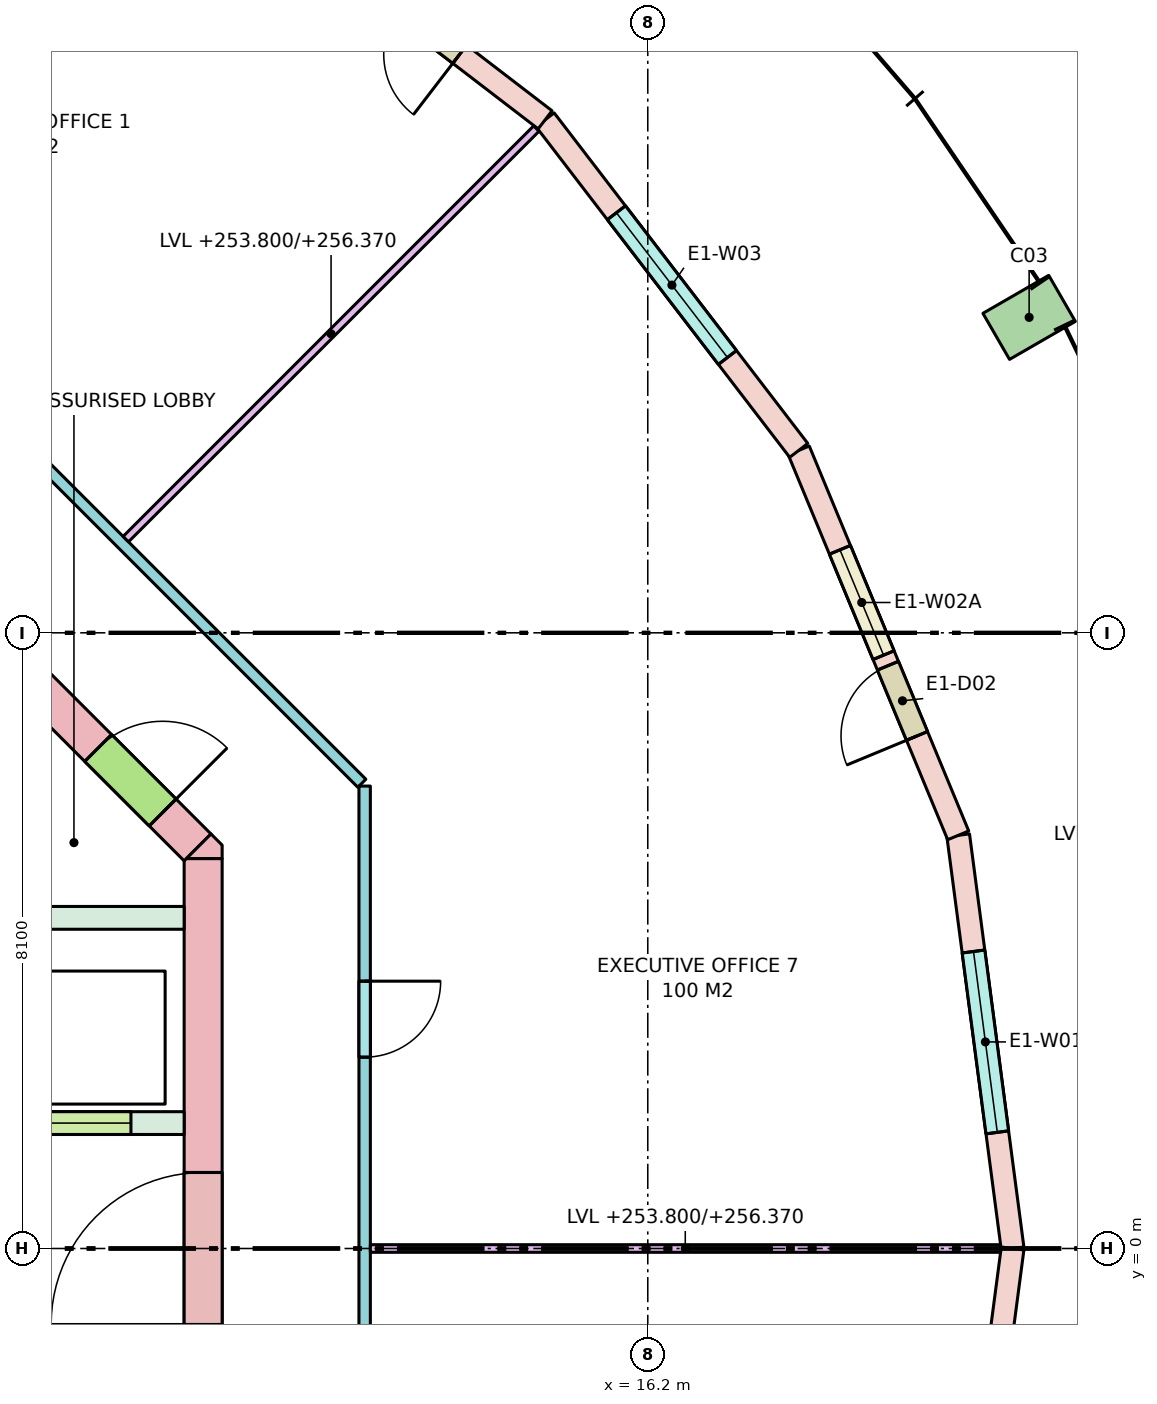
"""IFC4 building model, lengths in metres.
Left out: names, types, materials, properties, quantities, classifications, styles, units other than length and angle.
Written with IfcOpenShell. Run it as: python <this file> out.ifc"""

import sys

from ifc_helpers import new_model, si_unit, direction, frame, frame_2d, origin, origin_2d, place, context, subcontext, project, spatial, polyline, rectangle, outline, extrude, element, fill, save


model = new_model("IFC4")
c1 = context("Model", 3, precision=1e-05, world=origin(), true_north=direction((0.0, 1.0)))
c2 = subcontext(c1, "Body", "Model", "MODEL_VIEW")
j1 = project(units=[si_unit("LENGTHUNIT", "METRE"), si_unit("PLANEANGLEUNIT", "RADIAN")], contexts=[c1])
p1 = place(None, origin())
s1 = spatial("IfcSite", under=j1, at=p1, CompositionType="ELEMENT")
p2 = place(p1, origin())
s2 = spatial("IfcBuilding", under=s1, at=p2, CompositionType="ELEMENT")
p3 = place(p2, frame((0.0, 0.0, 253.8)))
s3 = spatial("IfcBuildingStorey", under=s2, at=p3, CompositionType="ELEMENT", Elevation=253.8)
p4 = place(p3, frame((21.218, 12.25, 0.0), z_axis=(0.0, 0.0, 1.0), x_axis=(-0.5, 0.866025403784, 0.0)))
e1 = element("IfcColumn", 1, at=p4, inside=s3, PredefinedType="COLUMN", context=c2, shape_type="SweptSolid", body=[
    extrude(rectangle(XDim=0.7, YDim=1.0, at=origin_2d()), origin(), (0.0, 0.0, 1.0), 3.7),
])
p5 = place(p3, frame((10.35, -5.13, -0.28), z_axis=(0.0, 0.0, 1.0), x_axis=(0.0, 1.0, 0.0)))
e2 = element("IfcWall", 2, at=p5, inside=s3, PredefinedType="SHEAR", context=c2, shape_type="SweptSolid", body=[
    extrude(rectangle(XDim=10.26, YDim=0.5, at=frame_2d((5.13, 0.0))), origin(), (0.0, 0.0, 1.0), 3.7),
])
p6 = place(p5, frame((4.13, 0.0, 0.28)))
e3 = element("IfcOpeningElement", 3, at=p6, cuts=e2, PredefinedType="OPENING", context=c2, shape_type="SweptSolid", body=[
    extrude(rectangle(XDim=2.0, YDim=2.1, at=frame_2d((1.0, 1.05))), frame((0.0, 0.26, 0.0), z_axis=(0.0, -1.0, 0.0), x_axis=(1.0, 0.0, 0.0)), (0.0, 0.0, 1.0), 0.52),
])
p7 = place(p3, frame((7.277, 8.277, -0.28), z_axis=(0.0, 0.0, 1.0), x_axis=(0.707106781187, -0.707106781187, 0.0)))
e4 = element("IfcWall", 4, at=p7, inside=s3, PredefinedType="SHEAR", context=c2, shape_type="SweptSolid", body=[
    extrude(rectangle(XDim=4.243, YDim=0.5, at=frame_2d((2.121, 0.0))), origin(), (0.0, 0.0, 1.0), 3.7),
])
p8 = place(p7, frame((2.393, 0.0, 0.28)))
e5 = element("IfcOpeningElement", 5, at=p8, cuts=e4, PredefinedType="OPENING", context=c2, shape_type="SweptSolid", body=[
    extrude(rectangle(XDim=1.2, YDim=2.1, at=frame_2d((0.6, 1.05))), frame((0.0, 0.26, 0.0), z_axis=(0.0, -1.0, 0.0), x_axis=(1.0, 0.0, 0.0)), (0.0, 0.0, 1.0), 0.52),
])
p9 = place(p3, frame((0.0, 0.0, -0.28)))
e6 = element("IfcWall", 6, at=p9, inside=s3, PredefinedType="SHEAR", context=c2, shape_type="SweptSolid", body=[
    extrude(outline(polyline([(10.6, 5.307), (10.6, 5.13), (10.13, 5.13), (10.454, 5.454), (10.6, 5.307)])), origin(), (0.0, 0.0, 1.0), 3.7),
])
p10 = place(p3, frame((2.0, 4.35, 0.0), z_axis=(0.0, 0.0, 1.0), x_axis=(1.0, 0.0, 0.0)))
e7 = element("IfcWall", 7, at=p10, inside=s3, PredefinedType="SOLIDWALL", context=c2, shape_type="SweptSolid", body=[
    extrude(rectangle(XDim=8.1, YDim=0.3, at=frame_2d((4.05, 0.0))), origin(), (0.0, 0.0, 1.0), 3.42),
])
p11 = place(p3, frame((2.0, 1.65, 0.0), z_axis=(0.0, 0.0, 1.0), x_axis=(1.0, 0.0, 0.0)))
e8 = element("IfcWall", 8, at=p11, inside=s3, PredefinedType="SOLIDWALL", context=c2, shape_type="SweptSolid", body=[
    extrude(rectangle(XDim=8.1, YDim=0.3, at=frame_2d((4.05, 0.0))), origin(), (0.0, 0.0, 1.0), 3.42),
])
p12 = place(p11, frame((0.85, 0.0, 0.0)))
e9 = element("IfcOpeningElement", 9, at=p12, cuts=e8, PredefinedType="OPENING", context=c2, shape_type="SweptSolid", body=[
    extrude(rectangle(XDim=1.1, YDim=2.1, at=frame_2d((0.55, 1.05))), frame((0.0, 0.16, 0.0), z_axis=(0.0, -1.0, 0.0), x_axis=(1.0, 0.0, 0.0)), (0.0, 0.0, 1.0), 0.32),
])
p13 = place(p11, frame((3.5, 0.0, 0.0)))
e10 = element("IfcOpeningElement", 10, at=p13, cuts=e8, PredefinedType="OPENING", context=c2, shape_type="SweptSolid", body=[
    extrude(rectangle(XDim=1.1, YDim=2.1, at=frame_2d((0.55, 1.05))), frame((0.0, 0.16, 0.0), z_axis=(0.0, -1.0, 0.0), x_axis=(1.0, 0.0, 0.0)), (0.0, 0.0, 1.0), 0.32),
])
p14 = place(p11, frame((6.3, 0.0, 0.0)))
e11 = element("IfcOpeningElement", 11, at=p14, cuts=e8, PredefinedType="OPENING", context=c2, shape_type="SweptSolid", body=[
    extrude(rectangle(XDim=1.1, YDim=2.1, at=frame_2d((0.55, 1.05))), frame((0.0, 0.16, 0.0), z_axis=(0.0, -1.0, 0.0), x_axis=(1.0, 0.0, 0.0)), (0.0, 0.0, 1.0), 0.32),
])
p15 = place(p3, frame((21.0, 0.0, 0.0), z_axis=(0.0, 0.0, 1.0), x_axis=(-0.130527087244, 0.991444743541, 0.0)))
e12 = element("IfcWall", 12, at=p15, inside=s3, PredefinedType="STANDARD", context=c2, shape_type="SweptSolid", body=[
    extrude(rectangle(XDim=5.482, YDim=0.3, at=frame_2d((2.741, 0.0))), origin(), (0.0, 0.0, 1.0), 3.42),
])
p16 = place(p15, frame((1.541, 0.0, 0.8)))
e13 = element("IfcOpeningElement", 13, at=p16, cuts=e12, PredefinedType="OPENING", context=c2, shape_type="SweptSolid", body=[
    extrude(rectangle(XDim=2.4, YDim=2.4, at=frame_2d((1.2, 1.2))), frame((0.0, 0.16, 0.0), z_axis=(0.0, -1.0, 0.0), x_axis=(1.0, 0.0, 0.0)), (0.0, 0.0, 1.0), 0.32),
])
p17 = place(p3, frame((20.284, 5.435, 0.0), z_axis=(0.0, 0.0, 1.0), x_axis=(-0.382688740813, 0.923877333662, 0.0)))
e14 = element("IfcWall", 14, at=p17, inside=s3, PredefinedType="STANDARD", context=c2, shape_type="SweptSolid", body=[
    extrude(rectangle(XDim=5.482, YDim=0.3, at=frame_2d((2.741, 0.0))), origin(), (0.0, 0.0, 1.0), 3.42),
])
p18 = place(p17, frame((1.416, 0.0, 0.0)))
e15 = element("IfcOpeningElement", 15, at=p18, cuts=e14, PredefinedType="OPENING", context=c2, shape_type="SweptSolid", body=[
    extrude(rectangle(XDim=1.0, YDim=2.4, at=frame_2d((0.5, 1.2))), frame((0.0, 0.16, 0.0), z_axis=(0.0, -1.0, 0.0), x_axis=(1.0, 0.0, 0.0)), (0.0, 0.0, 1.0), 0.32),
])
p19 = place(p17, frame((2.566, 0.0, 0.8)))
e16 = element("IfcOpeningElement", 16, at=p19, cuts=e14, PredefinedType="OPENING", context=c2, shape_type="SweptSolid", body=[
    extrude(rectangle(XDim=1.5, YDim=2.4, at=frame_2d((0.75, 1.2))), frame((0.0, 0.16, 0.0), z_axis=(0.0, -1.0, 0.0), x_axis=(1.0, 0.0, 0.0)), (0.0, 0.0, 1.0), 0.32),
])
p20 = place(p3, frame((18.187, 10.5, 0.0), z_axis=(0.0, 0.0, 1.0), x_axis=(-0.608784891166, 0.793335336593, 0.0)))
e17 = element("IfcWall", 17, at=p20, inside=s3, PredefinedType="STANDARD", context=c2, shape_type="SweptSolid", body=[
    extrude(rectangle(XDim=5.482, YDim=0.3, at=frame_2d((2.741, 0.0))), origin(), (0.0, 0.0, 1.0), 3.42),
])
p21 = place(p20, frame((1.541, 0.0, 0.8)))
e18 = element("IfcOpeningElement", 18, at=p21, cuts=e17, PredefinedType="OPENING", context=c2, shape_type="SweptSolid", body=[
    extrude(rectangle(XDim=2.4, YDim=2.4, at=frame_2d((1.2, 1.2))), frame((0.0, 0.16, 0.0), z_axis=(0.0, -1.0, 0.0), x_axis=(1.0, 0.0, 0.0)), (0.0, 0.0, 1.0), 0.32),
])
p22 = place(p3, frame((14.849, 14.849, 0.0), z_axis=(0.0, 0.0, 1.0), x_axis=(-0.793335336593, 0.608784891166, 0.0)))
e19 = element("IfcWall", 19, at=p22, inside=s3, PredefinedType="STANDARD", context=c2, shape_type="SweptSolid", body=[
    extrude(rectangle(XDim=5.482, YDim=0.3, at=frame_2d((2.741, 0.0))), origin(), (0.0, 0.0, 1.0), 3.42),
])
p23 = place(p22, frame((1.416, 0.0, 0.0)))
e20 = element("IfcOpeningElement", 20, at=p23, cuts=e19, PredefinedType="OPENING", context=c2, shape_type="SweptSolid", body=[
    extrude(rectangle(XDim=1.0, YDim=2.4, at=frame_2d((0.5, 1.2))), frame((0.0, 0.16, 0.0), z_axis=(0.0, -1.0, 0.0), x_axis=(1.0, 0.0, 0.0)), (0.0, 0.0, 1.0), 0.32),
])
p24 = place(p22, frame((2.566, 0.0, 0.8)))
e21 = element("IfcOpeningElement", 21, at=p24, cuts=e19, PredefinedType="OPENING", context=c2, shape_type="SweptSolid", body=[
    extrude(rectangle(XDim=1.5, YDim=2.4, at=frame_2d((0.75, 1.2))), frame((0.0, 0.16, 0.0), z_axis=(0.0, -1.0, 0.0), x_axis=(1.0, 0.0, 0.0)), (0.0, 0.0, 1.0), 0.32),
])
p25 = place(p3, frame((20.284, -5.435, 0.0), z_axis=(0.0, 0.0, 1.0), x_axis=(0.130527087244, 0.991444743541, 0.0)))
e22 = element("IfcWall", 22, at=p25, inside=s3, PredefinedType="STANDARD", context=c2, shape_type="SweptSolid", body=[
    extrude(rectangle(XDim=5.482, YDim=0.3, at=frame_2d((2.741, 0.0))), origin(), (0.0, 0.0, 1.0), 3.42),
])
p26 = place(p25, frame((1.416, 0.0, 0.0)))
e23 = element("IfcOpeningElement", 23, at=p26, cuts=e22, PredefinedType="OPENING", context=c2, shape_type="SweptSolid", body=[
    extrude(rectangle(XDim=1.0, YDim=2.4, at=frame_2d((0.5, 1.2))), frame((0.0, 0.16, 0.0), z_axis=(0.0, -1.0, 0.0), x_axis=(1.0, 0.0, 0.0)), (0.0, 0.0, 1.0), 0.32),
])
p27 = place(p25, frame((2.566, 0.0, 0.8)))
e24 = element("IfcOpeningElement", 24, at=p27, cuts=e22, PredefinedType="OPENING", context=c2, shape_type="SweptSolid", body=[
    extrude(rectangle(XDim=1.5, YDim=2.4, at=frame_2d((0.75, 1.2))), frame((0.0, 0.16, 0.0), z_axis=(0.0, -1.0, 0.0), x_axis=(1.0, 0.0, 0.0)), (0.0, 0.0, 1.0), 0.32),
])
p28 = place(p3, frame((8.121, 10.438, 0.0), z_axis=(0.0, 0.0, 1.0), x_axis=(0.707106781187, -0.707106781187, 0.0)))
e25 = element("IfcWall", 25, at=p28, inside=s3, PredefinedType="PARTITIONING", context=c2, shape_type="SweptSolid", body=[
    extrude(rectangle(XDim=6.105, YDim=0.15, at=frame_2d((3.053, 0.0))), origin(), (0.0, 0.0, 1.0), 2.57),
])
p29 = place(p3, frame((12.475, 6.084, 0.0), z_axis=(0.0, 0.0, 1.0), x_axis=(0.0, -1.0, 0.0)))
e26 = element("IfcWall", 26, at=p29, inside=s3, PredefinedType="PARTITIONING", context=c2, shape_type="SweptSolid", body=[
    extrude(rectangle(XDim=12.167, YDim=0.15, at=frame_2d((6.084, 0.0))), origin(), (0.0, 0.0, 1.0), 2.57),
])
p30 = place(p29, frame((8.601, 0.0, 0.0)))
e27 = element("IfcOpeningElement", 27, at=p30, cuts=e26, PredefinedType="OPENING", context=c2, shape_type="SweptSolid", body=[
    extrude(rectangle(XDim=1.0, YDim=2.1, at=frame_2d((0.5, 1.05))), frame((0.0, 0.085, 0.0), z_axis=(0.0, -1.0, 0.0), x_axis=(1.0, 0.0, 0.0)), (0.0, 0.0, 1.0), 0.17),
])
p31 = place(p29, frame((2.567, 0.0, 0.0)))
e28 = element("IfcOpeningElement", 28, at=p31, cuts=e26, PredefinedType="OPENING", context=c2, shape_type="SweptSolid", body=[
    extrude(rectangle(XDim=1.0, YDim=2.1, at=frame_2d((0.5, 1.05))), frame((0.0, 0.085, 0.0), z_axis=(0.0, -1.0, 0.0), x_axis=(1.0, 0.0, 0.0)), (0.0, 0.0, 1.0), 0.17),
])
p32 = place(p3, frame((12.55, 0.0, 0.0), z_axis=(0.0, 0.0, 1.0), x_axis=(1.0, 0.0, 0.0)))
e29 = element("IfcWall", 29, at=p32, inside=s3, PredefinedType="PARTITIONING", context=c2, shape_type="SweptSolid", body=[
    extrude(rectangle(XDim=8.287, YDim=0.1, at=frame_2d((4.143, 0.0))), origin(), (0.0, 0.0, 1.0), 2.57),
])
p33 = place(p3, frame((9.333, 9.333, 0.0), z_axis=(0.0, 0.0, 1.0), x_axis=(0.707106781187, 0.707106781187, 0.0)))
e30 = element("IfcWall", 30, at=p33, inside=s3, PredefinedType="PARTITIONING", context=c2, shape_type="SweptSolid", body=[
    extrude(rectangle(XDim=7.639, YDim=0.1, at=frame_2d((3.819, 0.0))), origin(), (0.0, 0.0, 1.0), 2.57),
])
p34 = place(p16, origin())
e31 = element("IfcWindow", 31, at=p34, inside=s3, PartitioningType="SINGLE_PANEL", PredefinedType="WINDOW", context=c2, shape_type="SweptSolid", body=[
    extrude(rectangle(XDim=2.4, YDim=2.4, at=frame_2d((1.2, 1.2))), frame((0.0, 0.03, 0.0), z_axis=(0.0, -1.0, 0.0), x_axis=(1.0, 0.0, 0.0)), (0.0, 0.0, 1.0), 0.06),
])
fill(e13, e31)
p35 = place(p18, origin())
e32 = element("IfcDoor", 32, at=p35, inside=s3, OperationType="SINGLE_SWING_LEFT", PredefinedType="DOOR", context=c2, shape_type="SweptSolid", body=[
    extrude(rectangle(XDim=1.0, YDim=2.4, at=frame_2d((0.5, 1.2))), frame((0.0, 0.025, 0.0), z_axis=(0.0, -1.0, 0.0), x_axis=(1.0, 0.0, 0.0)), (0.0, 0.0, 1.0), 0.05),
])
fill(e15, e32)
p36 = place(p19, origin())
e33 = element("IfcWindow", 33, at=p36, inside=s3, PartitioningType="SINGLE_PANEL", PredefinedType="WINDOW", context=c2, shape_type="SweptSolid", body=[
    extrude(rectangle(XDim=1.5, YDim=2.4, at=frame_2d((0.75, 1.2))), frame((0.0, 0.03, 0.0), z_axis=(0.0, -1.0, 0.0), x_axis=(1.0, 0.0, 0.0)), (0.0, 0.0, 1.0), 0.06),
])
fill(e16, e33)
p37 = place(p21, origin())
e34 = element("IfcWindow", 34, at=p37, inside=s3, PartitioningType="SINGLE_PANEL", PredefinedType="WINDOW", context=c2, shape_type="SweptSolid", body=[
    extrude(rectangle(XDim=2.4, YDim=2.4, at=frame_2d((1.2, 1.2))), frame((0.0, 0.03, 0.0), z_axis=(0.0, -1.0, 0.0), x_axis=(1.0, 0.0, 0.0)), (0.0, 0.0, 1.0), 0.06),
])
fill(e18, e34)
p38 = place(p23, origin())
e35 = element("IfcDoor", 35, at=p38, inside=s3, OperationType="SINGLE_SWING_LEFT", PredefinedType="DOOR", context=c2, shape_type="SweptSolid", body=[
    extrude(rectangle(XDim=1.0, YDim=2.4, at=frame_2d((0.5, 1.2))), frame((0.0, 0.025, 0.0), z_axis=(0.0, -1.0, 0.0), x_axis=(1.0, 0.0, 0.0)), (0.0, 0.0, 1.0), 0.05),
])
fill(e20, e35)
p39 = place(p14, origin())
e36 = element("IfcDoor", 36, at=p39, inside=s3, OperationType="DOUBLE_DOOR_SLIDING", PredefinedType="DOOR", context=c2, shape_type="SweptSolid", body=[
    extrude(rectangle(XDim=1.1, YDim=2.1, at=frame_2d((0.55, 1.05))), frame((0.0, 0.025, 0.0), z_axis=(0.0, -1.0, 0.0), x_axis=(1.0, 0.0, 0.0)), (0.0, 0.0, 1.0), 0.05),
])
fill(e11, e36)
p40 = place(p8, origin())
e37 = element("IfcDoor", 37, at=p40, inside=s3, OperationType="SINGLE_SWING_RIGHT", PredefinedType="DOOR", context=c2, shape_type="SweptSolid", body=[
    extrude(rectangle(XDim=1.2, YDim=2.1, at=frame_2d((0.6, 1.05))), frame((0.0, 0.025, 0.0), z_axis=(0.0, -1.0, 0.0), x_axis=(1.0, 0.0, 0.0)), (0.0, 0.0, 1.0), 0.05),
])
fill(e5, e37)
p41 = place(p6, origin())
e38 = element("IfcDoor", 38, at=p41, inside=s3, OperationType="DOUBLE_DOOR_SINGLE_SWING", PredefinedType="DOOR", context=c2, shape_type="SweptSolid", body=[
    extrude(rectangle(XDim=2.0, YDim=2.1, at=frame_2d((1.0, 1.05))), frame((0.0, 0.025, 0.0), z_axis=(0.0, -1.0, 0.0), x_axis=(1.0, 0.0, 0.0)), (0.0, 0.0, 1.0), 0.05),
])
fill(e3, e38)
p42 = place(p31, origin())
e39 = element("IfcDoor", 39, at=p42, inside=s3, OperationType="SINGLE_SWING_LEFT", PredefinedType="DOOR", context=c2, shape_type="SweptSolid", body=[
    extrude(rectangle(XDim=1.0, YDim=2.1, at=frame_2d((0.5, 1.05))), frame((0.0, 0.025, 0.0), z_axis=(0.0, -1.0, 0.0), x_axis=(1.0, 0.0, 0.0)), (0.0, 0.0, 1.0), 0.05),
])
fill(e28, e39)
save(model, sys.argv[1])
